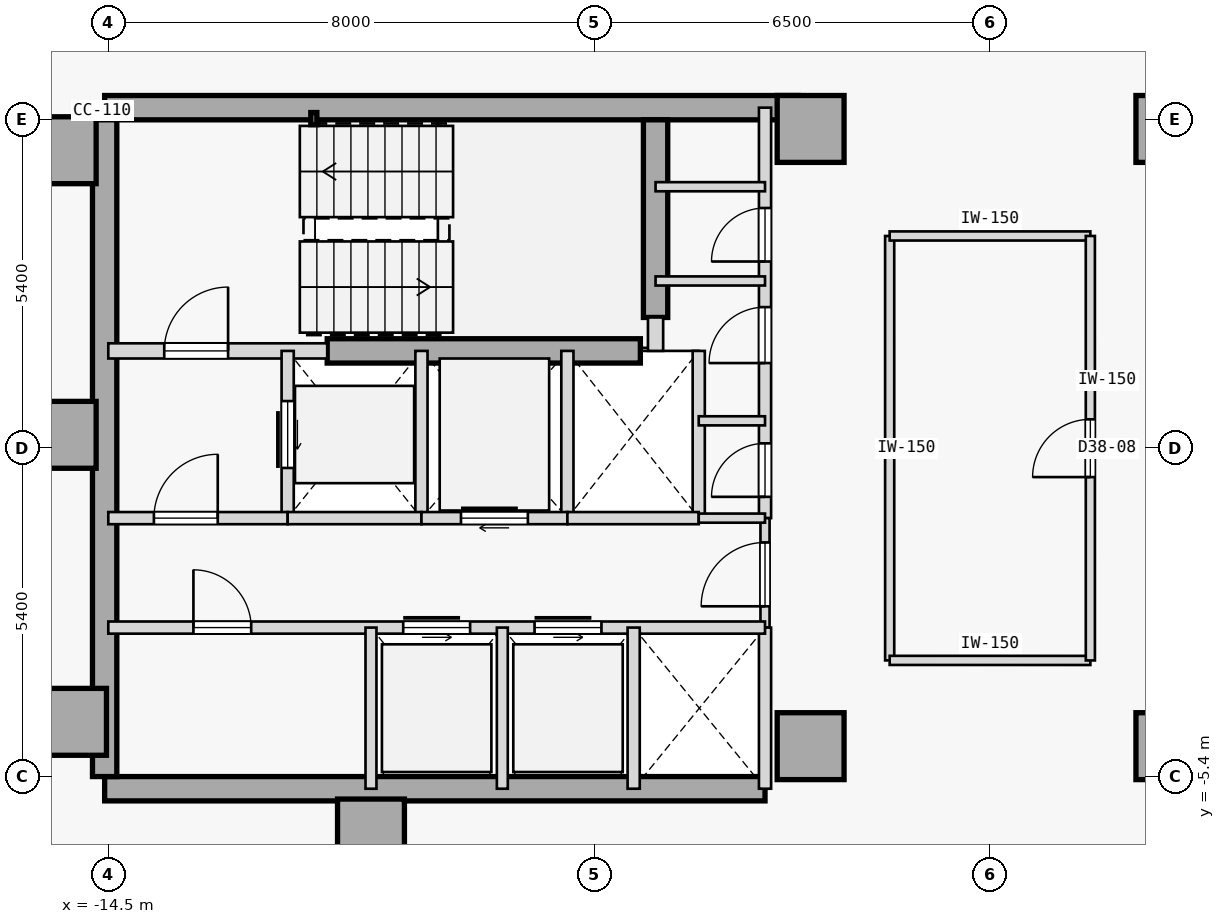
"""IFC4 building model, lengths in metres.
Left out: names, types, materials, properties, quantities, classifications, styles, units other than length and angle.
Written with IfcOpenShell. Run it as: python <this file> out.ifc"""

import sys

from ifc_helpers import new_model, si_unit, direction, frame, frame_2d, origin, origin_2d, place, context, subcontext, project, spatial, rectangle, hollow_rectangle, extrude, element, fill, save


model = new_model("IFC4")
c1 = context("Model", 3, precision=1e-05, world=origin(), true_north=direction((0.0, 1.0)))
c2 = subcontext(c1, "Body", "Model", "MODEL_VIEW")
j1 = project(units=[si_unit("LENGTHUNIT", "METRE"), si_unit("PLANEANGLEUNIT", "RADIAN")], contexts=[c1])
p1 = place(None, origin())
s1 = spatial("IfcSite", under=j1, at=p1, CompositionType="ELEMENT")
p2 = place(p1, origin())
s2 = spatial("IfcBuilding", under=s1, at=p2, CompositionType="ELEMENT")
p3 = place(p2, frame((0.0, 0.0, 151.4)))
s3 = spatial("IfcBuildingStorey", under=s2, at=p3, CompositionType="ELEMENT", Elevation=151.4)
for number, where, z_axis, x_axis in (
    (1, (-15.25, 4.9, 0.0), (0.0, 0.0, 1.0), (1.0, 0.0, 0.0)),
    (2, (-15.25, 0.22, 0.0), (0.0, 0.0, 1.0), (1.0, 0.0, 0.0)),
    (3, (-15.08, -4.5, 0.0), (0.0, 0.0, 1.0), (1.0, 0.0, 0.0)),
    (4, (-10.18, -6.32, 0.0), (0.0, 0.0, 1.0), (1.0, 0.0, 0.0)),
    (5, (-2.95, -4.9, 0.0), (0.0, 0.0, 1.0), (1.0, 0.0, 0.0)),
    (6, (-2.95, 5.25, 0.0), (0.0, 0.0, 1.0), (1.0, 0.0, 0.0)),
    (7, (2.95, -4.9, 0.0), (0.0, 0.0, 1.0), (1.0, 0.0, 0.0)),
    (8, (2.95, 5.25, 0.0), (0.0, 0.0, 1.0), (1.0, 0.0, 0.0)),
):
    element("IfcColumn", number, at=place(p3, frame(where, z_axis=z_axis, x_axis=x_axis)), inside=s3, PredefinedType="COLUMN", context=c2, shape_type="SweptSolid", body=[
        extrude(rectangle(XDim=1.1, YDim=1.1, at=origin_2d()), origin(), (0.0, 0.0, 1.0), 3.4),
    ])
p4 = place(p3, frame((-14.56, 5.6, 0.0), z_axis=(0.0, 0.0, 1.0), x_axis=(1.0, 0.0, 0.0)))
e9 = element("IfcWall", 9, at=p4, inside=s3, PredefinedType="SHEAR", context=c2, shape_type="SweptSolid", body=[
    extrude(rectangle(XDim=11.41, YDim=0.4, at=frame_2d((5.705, 0.0))), origin(), (0.0, 0.0, 1.0), 3.175),
])
p5 = place(p3, frame((-14.56, -5.6, 0.0), z_axis=(0.0, 0.0, 1.0), x_axis=(1.0, 0.0, 0.0)))
e10 = element("IfcWall", 10, at=p5, inside=s3, PredefinedType="SHEAR", context=c2, shape_type="SweptSolid", body=[
    extrude(rectangle(XDim=10.86, YDim=0.4, at=frame_2d((5.43, 0.0))), origin(), (0.0, 0.0, 1.0), 3.175),
])
p6 = place(p3, frame((-14.56, -5.4, 0.0), z_axis=(0.0, 0.0, 1.0), x_axis=(0.0, 1.0, 0.0)))
e11 = element("IfcWall", 11, at=p6, inside=s3, PredefinedType="SHEAR", context=c2, shape_type="SweptSolid", body=[
    extrude(rectangle(XDim=10.8, YDim=0.4, at=frame_2d((5.4, 0.0))), origin(), (0.0, 0.0, 1.0), 3.175),
])
p7 = place(p3, frame((-5.5, 2.15, 0.0), z_axis=(0.0, 0.0, 1.0), x_axis=(0.0, 1.0, 0.0)))
e12 = element("IfcWall", 12, at=p7, inside=s3, PredefinedType="SHEAR", context=c2, shape_type="SweptSolid", body=[
    extrude(rectangle(XDim=3.25, YDim=0.4, at=frame_2d((1.625, 0.0))), origin(), (0.0, 0.0, 1.0), 3.175),
])
p8 = place(p3, frame((-10.9, 1.6, 0.0), z_axis=(0.0, 0.0, 1.0), x_axis=(1.0, 0.0, 0.0)))
e13 = element("IfcWall", 13, at=p8, inside=s3, PredefinedType="SHEAR", context=c2, shape_type="SweptSolid", body=[
    extrude(rectangle(XDim=5.15, YDim=0.4, at=frame_2d((2.575, 0.0))), origin(), (0.0, 0.0, 1.0), 3.175),
])
p9 = place(p3, frame((-11.12, 5.42, 0.0), z_axis=(0.0, 0.0, 1.0), x_axis=(1.0, 0.0, 0.0)))
e14 = element("IfcColumn", 14, at=p9, inside=s3, PredefinedType="COLUMN", context=c2, shape_type="SweptSolid", body=[
    extrude(hollow_rectangle(XDim=0.1, YDim=0.2, WallThickness=0.008, at=origin_2d()), origin(), (0.0, 0.0, 1.0), 3.4),
])
p10 = place(p3, frame((-14.5, 1.6, 0.0), z_axis=(0.0, 0.0, 1.0), x_axis=(1.0, 0.0, 0.0)))
e15 = element("IfcWall", 15, at=p10, inside=s3, PredefinedType="STANDARD", context=c2, shape_type="SweptSolid", body=[
    extrude(rectangle(XDim=3.6, YDim=0.25, at=frame_2d((1.8, 0.0))), origin(), (0.0, 0.0, 1.0), 3.175),
])
p11 = place(p10, frame((0.92, 0.0, 0.0)))
e16 = element("IfcOpeningElement", 16, at=p11, cuts=e15, PredefinedType="OPENING", context=c2, shape_type="SweptSolid", body=[
    extrude(rectangle(XDim=1.05, YDim=2.15, at=frame_2d((0.525, 1.075))), frame((0.0, 0.135, 0.0), z_axis=(0.0, -1.0, 0.0), x_axis=(1.0, 0.0, 0.0)), (0.0, 0.0, 1.0), 0.27),
])
p12 = place(p3, frame((-5.5, 1.6, 0.0), z_axis=(0.0, 0.0, 1.0), x_axis=(0.0, 1.0, 0.0)))
e17 = element("IfcWall", 17, at=p12, inside=s3, PredefinedType="STANDARD", context=c2, shape_type="SweptSolid", body=[
    extrude(rectangle(XDim=0.55, YDim=0.25, at=frame_2d((0.275, 0.0))), origin(), (0.0, 0.0, 1.0), 3.175),
])
p13 = place(p3, frame((-3.7, -1.15, 0.0), z_axis=(0.0, 0.0, 1.0), x_axis=(0.0, 1.0, 0.0)))
e18 = element("IfcWall", 18, at=p13, inside=s3, PredefinedType="STANDARD", context=c2, shape_type="SweptSolid", body=[
    extrude(rectangle(XDim=6.75, YDim=0.2, at=frame_2d((3.375, 0.0))), origin(), (0.0, 0.0, 1.0), 3.175),
])
p14 = place(p13, frame((0.35, 0.0, 0.0)))
e19 = element("IfcOpeningElement", 19, at=p14, cuts=e18, PredefinedType="OPENING", context=c2, shape_type="SweptSolid", body=[
    extrude(rectangle(XDim=0.88, YDim=2.15, at=frame_2d((0.44, 1.075))), frame((0.0, 0.11, 0.0), z_axis=(0.0, -1.0, 0.0), x_axis=(1.0, 0.0, 0.0)), (0.0, 0.0, 1.0), 0.22),
])
p15 = place(p13, frame((2.55, 0.0, 0.0)))
e20 = element("IfcOpeningElement", 20, at=p15, cuts=e18, PredefinedType="OPENING", context=c2, shape_type="SweptSolid", body=[
    extrude(rectangle(XDim=0.92, YDim=2.15, at=frame_2d((0.46, 1.075))), frame((0.0, 0.11, 0.0), z_axis=(0.0, -1.0, 0.0), x_axis=(1.0, 0.0, 0.0)), (0.0, 0.0, 1.0), 0.22),
])
p16 = place(p13, frame((4.22, 0.0, 0.0)))
e21 = element("IfcOpeningElement", 21, at=p16, cuts=e18, PredefinedType="OPENING", context=c2, shape_type="SweptSolid", body=[
    extrude(rectangle(XDim=0.88, YDim=2.15, at=frame_2d((0.44, 1.075))), frame((0.0, 0.11, 0.0), z_axis=(0.0, -1.0, 0.0), x_axis=(1.0, 0.0, 0.0)), (0.0, 0.0, 1.0), 0.22),
])
p17 = place(p3, frame((-3.7, -2.95, 0.0), z_axis=(0.0, 0.0, 1.0), x_axis=(0.0, 1.0, 0.0)))
e22 = element("IfcWall", 22, at=p17, inside=s3, PredefinedType="PARTITIONING", context=c2, shape_type="SweptSolid", body=[
    extrude(rectangle(XDim=1.8, YDim=0.15, at=frame_2d((0.9, 0.0))), origin(), (0.0, 0.0, 1.0), 3.175),
])
p18 = place(p17, frame((0.35, 0.0, 0.0)))
e23 = element("IfcOpeningElement", 23, at=p18, cuts=e22, PredefinedType="OPENING", context=c2, shape_type="SweptSolid", body=[
    extrude(rectangle(XDim=1.05, YDim=2.18, at=frame_2d((0.525, 1.09))), frame((0.0, 0.085, 0.0), z_axis=(0.0, -1.0, 0.0), x_axis=(1.0, 0.0, 0.0)), (0.0, 0.0, 1.0), 0.17),
])
p19 = place(p3, frame((-3.7, -5.6, 0.0), z_axis=(0.0, 0.0, 1.0), x_axis=(0.0, 1.0, 0.0)))
e24 = element("IfcWall", 24, at=p19, inside=s3, PredefinedType="STANDARD", context=c2, shape_type="SweptSolid", body=[
    extrude(rectangle(XDim=2.65, YDim=0.2, at=frame_2d((1.325, 0.0))), origin(), (0.0, 0.0, 1.0), 3.175),
])
p20 = place(p3, frame((-11.55, -1.15, 0.0), z_axis=(0.0, 0.0, 1.0), x_axis=(0.0, 1.0, 0.0)))
e25 = element("IfcWall", 25, at=p20, inside=s3, PredefinedType="STANDARD", context=c2, shape_type="SweptSolid", body=[
    extrude(rectangle(XDim=2.75, YDim=0.2, at=frame_2d((1.375, 0.0))), origin(), (0.0, 0.0, 1.0), 3.175),
])
p21 = place(p20, frame((0.825, 0.0, 0.0)))
e26 = element("IfcOpeningElement", 26, at=p21, cuts=e25, PredefinedType="OPENING", context=c2, shape_type="SweptSolid", body=[
    extrude(rectangle(XDim=1.1, YDim=2.15, at=frame_2d((0.55, 1.075))), frame((0.0, 0.11, 0.0), z_axis=(0.0, -1.0, 0.0), x_axis=(1.0, 0.0, 0.0)), (0.0, 0.0, 1.0), 0.22),
])
p22 = place(p3, frame((-9.35, -1.15, 0.0), z_axis=(0.0, 0.0, 1.0), x_axis=(0.0, 1.0, 0.0)))
e27 = element("IfcWall", 27, at=p22, inside=s3, PredefinedType="STANDARD", context=c2, shape_type="SweptSolid", body=[
    extrude(rectangle(XDim=2.75, YDim=0.2, at=frame_2d((1.375, 0.0))), origin(), (0.0, 0.0, 1.0), 3.175),
])
p23 = place(p3, frame((-14.5, -1.15, 0.0), z_axis=(0.0, 0.0, 1.0), x_axis=(1.0, 0.0, 0.0)))
e28 = element("IfcWall", 28, at=p23, inside=s3, PredefinedType="STANDARD", context=c2, shape_type="SweptSolid", body=[
    extrude(rectangle(XDim=2.95, YDim=0.2, at=frame_2d((1.475, 0.0))), origin(), (0.0, 0.0, 1.0), 3.175),
])
p24 = place(p23, frame((0.75, 0.0, 0.0)))
e29 = element("IfcOpeningElement", 29, at=p24, cuts=e28, PredefinedType="OPENING", context=c2, shape_type="SweptSolid", body=[
    extrude(rectangle(XDim=1.05, YDim=2.18, at=frame_2d((0.525, 1.09))), frame((0.0, 0.11, 0.0), z_axis=(0.0, -1.0, 0.0), x_axis=(1.0, 0.0, 0.0)), (0.0, 0.0, 1.0), 0.22),
])
p25 = place(p3, frame((-11.55, -1.15, 0.0), z_axis=(0.0, 0.0, 1.0), x_axis=(1.0, 0.0, 0.0)))
e30 = element("IfcWall", 30, at=p25, inside=s3, PredefinedType="STANDARD", context=c2, shape_type="SweptSolid", body=[
    extrude(rectangle(XDim=2.2, YDim=0.2, at=frame_2d((1.1, 0.0))), origin(), (0.0, 0.0, 1.0), 3.175),
])
p26 = place(p3, frame((-6.95, -1.15, 0.0), z_axis=(0.0, 0.0, 1.0), x_axis=(0.0, 1.0, 0.0)))
e31 = element("IfcWall", 31, at=p26, inside=s3, PredefinedType="STANDARD", context=c2, shape_type="SweptSolid", body=[
    extrude(rectangle(XDim=2.75, YDim=0.2, at=frame_2d((1.375, 0.0))), origin(), (0.0, 0.0, 1.0), 3.175),
])
p27 = place(p3, frame((-9.35, -1.15, 0.0), z_axis=(0.0, 0.0, 1.0), x_axis=(1.0, 0.0, 0.0)))
e32 = element("IfcWall", 32, at=p27, inside=s3, PredefinedType="STANDARD", context=c2, shape_type="SweptSolid", body=[
    extrude(rectangle(XDim=2.4, YDim=0.2, at=frame_2d((1.2, 0.0))), origin(), (0.0, 0.0, 1.0), 3.175),
])
p28 = place(p27, frame((0.65, 0.0, 0.0)))
e33 = element("IfcOpeningElement", 33, at=p28, cuts=e32, PredefinedType="OPENING", context=c2, shape_type="SweptSolid", body=[
    extrude(rectangle(XDim=1.1, YDim=2.15, at=frame_2d((0.55, 1.075))), frame((0.0, 0.11, 0.0), z_axis=(0.0, -1.0, 0.0), x_axis=(1.0, 0.0, 0.0)), (0.0, 0.0, 1.0), 0.22),
])
p29 = place(p3, frame((-4.79, -1.15, 0.0), z_axis=(0.0, 0.0, 1.0), x_axis=(0.0, 1.0, 0.0)))
e34 = element("IfcWall", 34, at=p29, inside=s3, PredefinedType="STANDARD", context=c2, shape_type="SweptSolid", body=[
    extrude(rectangle(XDim=2.75, YDim=0.2, at=frame_2d((1.375, 0.0))), origin(), (0.0, 0.0, 1.0), 3.175),
])
p30 = place(p3, frame((-6.95, -1.15, 0.0), z_axis=(0.0, 0.0, 1.0), x_axis=(1.0, 0.0, 0.0)))
e35 = element("IfcWall", 35, at=p30, inside=s3, PredefinedType="STANDARD", context=c2, shape_type="SweptSolid", body=[
    extrude(rectangle(XDim=2.16, YDim=0.2, at=frame_2d((1.08, 0.0))), origin(), (0.0, 0.0, 1.0), 3.175),
])
p31 = place(p3, frame((-4.79, -1.15, 0.0), z_axis=(0.0, 0.0, 1.0), x_axis=(1.0, 0.0, 0.0)))
e36 = element("IfcWall", 36, at=p31, inside=s3, PredefinedType="PARTITIONING", context=c2, shape_type="SweptSolid", body=[
    extrude(rectangle(XDim=1.09, YDim=0.15, at=frame_2d((0.545, 0.0))), origin(), (0.0, 0.0, 1.0), 3.175),
])
p32 = place(p3, frame((-14.5, -2.95, 0.0), z_axis=(0.0, 0.0, 1.0), x_axis=(1.0, 0.0, 0.0)))
e37 = element("IfcWall", 37, at=p32, inside=s3, PredefinedType="STANDARD", context=c2, shape_type="SweptSolid", body=[
    extrude(rectangle(XDim=10.8, YDim=0.2, at=frame_2d((5.4, 0.0))), origin(), (0.0, 0.0, 1.0), 3.175),
])
p33 = place(p32, frame((4.85, 0.0, 0.0)))
e38 = element("IfcOpeningElement", 38, at=p33, cuts=e37, PredefinedType="OPENING", context=c2, shape_type="SweptSolid", body=[
    extrude(rectangle(XDim=1.1, YDim=2.15, at=frame_2d((0.55, 1.075))), frame((0.0, 0.11, 0.0), z_axis=(0.0, -1.0, 0.0), x_axis=(1.0, 0.0, 0.0)), (0.0, 0.0, 1.0), 0.22),
])
p34 = place(p32, frame((7.01, 0.0, 0.0)))
e39 = element("IfcOpeningElement", 39, at=p34, cuts=e37, PredefinedType="OPENING", context=c2, shape_type="SweptSolid", body=[
    extrude(rectangle(XDim=1.1, YDim=2.15, at=frame_2d((0.55, 1.075))), frame((0.0, 0.11, 0.0), z_axis=(0.0, -1.0, 0.0), x_axis=(1.0, 0.0, 0.0)), (0.0, 0.0, 1.0), 0.22),
])
p35 = place(p32, frame((1.4, 0.0, 0.0)))
e40 = element("IfcOpeningElement", 40, at=p35, cuts=e37, PredefinedType="OPENING", context=c2, shape_type="SweptSolid", body=[
    extrude(rectangle(XDim=0.95, YDim=2.15, at=frame_2d((0.475, 1.075))), frame((0.0, 0.11, 0.0), z_axis=(0.0, -1.0, 0.0), x_axis=(1.0, 0.0, 0.0)), (0.0, 0.0, 1.0), 0.22),
])
p36 = place(p3, frame((-5.86, -5.6, 0.0), z_axis=(0.0, 0.0, 1.0), x_axis=(0.0, 1.0, 0.0)))
e41 = element("IfcWall", 41, at=p36, inside=s3, PredefinedType="STANDARD", context=c2, shape_type="SweptSolid", body=[
    extrude(rectangle(XDim=2.65, YDim=0.2, at=frame_2d((1.325, 0.0))), origin(), (0.0, 0.0, 1.0), 3.175),
])
for number, where, z_axis, x_axis in (
    (42, (-10.18, -5.6, 0.0), (0.0, 0.0, 1.0), (0.0, 1.0, 0.0)),
    (43, (-8.02, -5.6, 0.0), (0.0, 0.0, 1.0), (0.0, 1.0, 0.0)),
):
    element("IfcWall", number, at=place(p3, frame(where, z_axis=z_axis, x_axis=x_axis)), inside=s3, PredefinedType="STANDARD", context=c2, shape_type="SweptSolid", body=[
        extrude(rectangle(XDim=2.65, YDim=0.18, at=frame_2d((1.325, 0.0))), origin(), (0.0, 0.0, 1.0), 3.175),
    ])
p37 = place(p3, frame((-5.5, 4.3, 0.0), z_axis=(0.0, 0.0, 1.0), x_axis=(1.0, 0.0, 0.0)))
e44 = element("IfcWall", 44, at=p37, inside=s3, PredefinedType="PARTITIONING", context=c2, shape_type="SweptSolid", body=[
    extrude(rectangle(XDim=1.8, YDim=0.15, at=frame_2d((0.9, 0.0))), origin(), (0.0, 0.0, 1.0), 3.175),
])
p38 = place(p3, frame((-4.79, 0.45, 0.0), z_axis=(0.0, 0.0, 1.0), x_axis=(1.0, 0.0, 0.0)))
e45 = element("IfcWall", 45, at=p38, inside=s3, PredefinedType="PARTITIONING", context=c2, shape_type="SweptSolid", body=[
    extrude(rectangle(XDim=1.09, YDim=0.15, at=frame_2d((0.545, 0.0))), origin(), (0.0, 0.0, 1.0), 3.175),
])
p39 = place(p3, frame((-5.5, 2.75, 0.0), z_axis=(0.0, 0.0, 1.0), x_axis=(1.0, 0.0, 0.0)))
e46 = element("IfcWall", 46, at=p39, inside=s3, PredefinedType="PARTITIONING", context=c2, shape_type="SweptSolid", body=[
    extrude(rectangle(XDim=1.8, YDim=0.15, at=frame_2d((0.9, 0.0))), origin(), (0.0, 0.0, 1.0), 3.175),
])
p40 = place(p3, frame((-1.65, -3.49, 0.0), z_axis=(0.0, 0.0, 1.0), x_axis=(-3.4979712e-05, 0.999999999388, 0.0)))
e47 = element("IfcWall", 47, at=p40, inside=s3, PredefinedType="PARTITIONING", context=c2, shape_type="SweptSolid", body=[
    extrude(rectangle(XDim=6.979, YDim=0.15, at=frame_2d((3.49, 0.0))), origin(), (0.0, 0.0, 1.0), 3.175),
])
p41 = place(p3, frame((-1.65, -3.49, 0.0), z_axis=(0.0, 0.0, 1.0), x_axis=(0.999999975374, -0.000221926315, 0.0)))
e48 = element("IfcWall", 48, at=p41, inside=s3, PredefinedType="PARTITIONING", context=c2, shape_type="SweptSolid", body=[
    extrude(rectangle(XDim=3.3, YDim=0.15, at=frame_2d((1.65, 0.0))), origin(), (0.0, 0.0, 1.0), 3.175),
])
p42 = place(p3, frame((-1.65, 3.49, 0.0), z_axis=(0.0, 0.0, 1.0), x_axis=(1.0, 0.0, 0.0)))
e49 = element("IfcWall", 49, at=p42, inside=s3, PredefinedType="PARTITIONING", context=c2, shape_type="SweptSolid", body=[
    extrude(rectangle(XDim=3.3, YDim=0.15, at=frame_2d((1.65, 0.0))), origin(), (0.0, 0.0, 1.0), 3.175),
])
p43 = place(p3, frame((1.65, -3.49, 0.0), z_axis=(0.0, 0.0, 1.0), x_axis=(-6.9952083e-05, 0.999999997553, 0.0)))
e50 = element("IfcWall", 50, at=p43, inside=s3, PredefinedType="PARTITIONING", context=c2, shape_type="SweptSolid", body=[
    extrude(rectangle(XDim=6.98, YDim=0.15, at=frame_2d((3.49, 0.0))), origin(), (0.0, 0.0, 1.0), 3.175),
])
p44 = place(p43, frame((3.015, 0.0, 0.0)))
e51 = element("IfcOpeningElement", 51, at=p44, cuts=e50, PredefinedType="OPENING", context=c2, shape_type="SweptSolid", body=[
    extrude(rectangle(XDim=0.95, YDim=2.15, at=frame_2d((0.475, 1.075))), frame((0.0, 0.085, 0.0), z_axis=(0.0, -1.0, 0.0), x_axis=(1.0, 0.0, 0.0)), (0.0, 0.0, 1.0), 0.17),
])
p45 = place(p11, origin())
e52 = element("IfcDoor", 52, at=p45, inside=s3, OperationType="SINGLE_SWING_RIGHT", PredefinedType="DOOR", context=c2, shape_type="SweptSolid", body=[
    extrude(rectangle(XDim=1.05, YDim=2.15, at=frame_2d((0.525, 1.075))), frame((0.0, 0.025, 0.0), z_axis=(0.0, -1.0, 0.0), x_axis=(1.0, 0.0, 0.0)), (0.0, 0.0, 1.0), 0.05),
])
fill(e16, e52)
p46 = place(p24, origin())
e53 = element("IfcDoor", 53, at=p46, inside=s3, OperationType="SINGLE_SWING_RIGHT", PredefinedType="DOOR", context=c2, shape_type="SweptSolid", body=[
    extrude(rectangle(XDim=1.05, YDim=2.18, at=frame_2d((0.525, 1.09))), frame((0.0, 0.025, 0.0), z_axis=(0.0, -1.0, 0.0), x_axis=(1.0, 0.0, 0.0)), (0.0, 0.0, 1.0), 0.05),
])
fill(e29, e53)
p47 = place(p18, origin())
e54 = element("IfcDoor", 54, at=p47, inside=s3, OperationType="SINGLE_SWING_LEFT", PredefinedType="DOOR", context=c2, shape_type="SweptSolid", body=[
    extrude(rectangle(XDim=1.05, YDim=2.18, at=frame_2d((0.525, 1.09))), frame((0.0, 0.025, 0.0), z_axis=(0.0, -1.0, 0.0), x_axis=(1.0, 0.0, 0.0)), (0.0, 0.0, 1.0), 0.05),
])
fill(e23, e54)
p48 = place(p21, origin())
e55 = element("IfcDoor", 55, at=p48, inside=s3, OperationType="SLIDING_TO_RIGHT", PredefinedType="DOOR", context=c2, shape_type="SweptSolid", body=[
    extrude(rectangle(XDim=1.1, YDim=2.15, at=frame_2d((0.55, 1.075))), frame((0.0, 0.025, 0.0), z_axis=(0.0, -1.0, 0.0), x_axis=(1.0, 0.0, 0.0)), (0.0, 0.0, 1.0), 0.05),
])
fill(e26, e55)
p49 = place(p28, origin())
e56 = element("IfcDoor", 56, at=p49, inside=s3, OperationType="SLIDING_TO_RIGHT", PredefinedType="DOOR", context=c2, shape_type="SweptSolid", body=[
    extrude(rectangle(XDim=1.1, YDim=2.15, at=frame_2d((0.55, 1.075))), frame((0.0, 0.025, 0.0), z_axis=(0.0, -1.0, 0.0), x_axis=(1.0, 0.0, 0.0)), (0.0, 0.0, 1.0), 0.05),
])
fill(e33, e56)
p50 = place(p33, origin())
e57 = element("IfcDoor", 57, at=p50, inside=s3, OperationType="SLIDING_TO_LEFT", PredefinedType="DOOR", context=c2, shape_type="SweptSolid", body=[
    extrude(rectangle(XDim=1.1, YDim=2.15, at=frame_2d((0.55, 1.075))), frame((0.0, 0.025, 0.0), z_axis=(0.0, -1.0, 0.0), x_axis=(1.0, 0.0, 0.0)), (0.0, 0.0, 1.0), 0.05),
])
fill(e38, e57)
p51 = place(p34, origin())
e58 = element("IfcDoor", 58, at=p51, inside=s3, OperationType="SLIDING_TO_LEFT", PredefinedType="DOOR", context=c2, shape_type="SweptSolid", body=[
    extrude(rectangle(XDim=1.1, YDim=2.15, at=frame_2d((0.55, 1.075))), frame((0.0, 0.025, 0.0), z_axis=(0.0, -1.0, 0.0), x_axis=(1.0, 0.0, 0.0)), (0.0, 0.0, 1.0), 0.05),
])
fill(e39, e58)
p52 = place(p35, origin())
e59 = element("IfcDoor", 59, at=p52, inside=s3, OperationType="SINGLE_SWING_LEFT", PredefinedType="DOOR", context=c2, shape_type="SweptSolid", body=[
    extrude(rectangle(XDim=0.95, YDim=2.15, at=frame_2d((0.475, 1.075))), frame((0.0, 0.025, 0.0), z_axis=(0.0, -1.0, 0.0), x_axis=(1.0, 0.0, 0.0)), (0.0, 0.0, 1.0), 0.05),
])
fill(e40, e59)
p53 = place(p14, origin())
e60 = element("IfcDoor", 60, at=p53, inside=s3, OperationType="SINGLE_SWING_LEFT", PredefinedType="DOOR", context=c2, shape_type="SweptSolid", body=[
    extrude(rectangle(XDim=0.88, YDim=2.15, at=frame_2d((0.44, 1.075))), frame((0.0, 0.025, 0.0), z_axis=(0.0, -1.0, 0.0), x_axis=(1.0, 0.0, 0.0)), (0.0, 0.0, 1.0), 0.05),
])
fill(e19, e60)
p54 = place(p15, origin())
e61 = element("IfcDoor", 61, at=p54, inside=s3, OperationType="SINGLE_SWING_LEFT", PredefinedType="DOOR", context=c2, shape_type="SweptSolid", body=[
    extrude(rectangle(XDim=0.92, YDim=2.15, at=frame_2d((0.46, 1.075))), frame((0.0, 0.025, 0.0), z_axis=(0.0, -1.0, 0.0), x_axis=(1.0, 0.0, 0.0)), (0.0, 0.0, 1.0), 0.05),
])
fill(e20, e61)
p55 = place(p16, origin())
e62 = element("IfcDoor", 62, at=p55, inside=s3, OperationType="SINGLE_SWING_LEFT", PredefinedType="DOOR", context=c2, shape_type="SweptSolid", body=[
    extrude(rectangle(XDim=0.88, YDim=2.15, at=frame_2d((0.44, 1.075))), frame((0.0, 0.025, 0.0), z_axis=(0.0, -1.0, 0.0), x_axis=(1.0, 0.0, 0.0)), (0.0, 0.0, 1.0), 0.05),
])
fill(e21, e62)
p56 = place(p44, origin())
e63 = element("IfcDoor", 63, at=p56, inside=s3, OperationType="SINGLE_SWING_LEFT", PredefinedType="DOOR", context=c2, shape_type="SweptSolid", body=[
    extrude(rectangle(XDim=0.95, YDim=2.15, at=frame_2d((0.475, 1.075))), frame((0.0, 0.025, 0.0), z_axis=(0.0, -1.0, 0.0), x_axis=(1.0, 0.0, 0.0)), (0.0, 0.0, 1.0), 0.05),
])
fill(e51, e63)
save(model, sys.argv[1])
